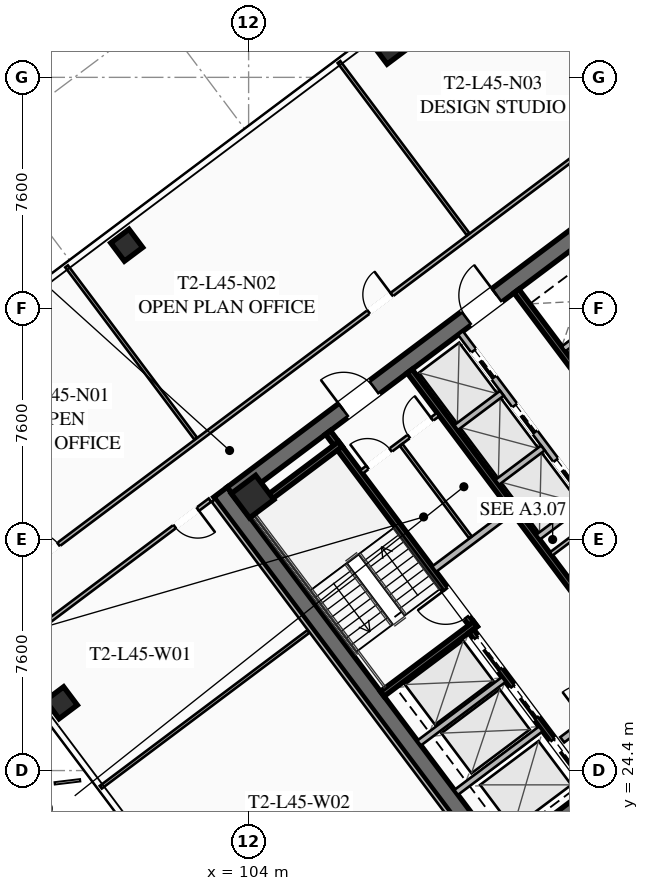
"""IFC4 building model, lengths in metres.
Left out: names, types, materials, properties, quantities, classifications, styles, units other than length and angle.
Written with IfcOpenShell. Run it as: python <this file> out.ifc"""

import sys

from ifc_helpers import new_model, si_unit, direction, frame, frame_2d, origin, origin_2d, place, context, subcontext, project, spatial, rectangle, hollow_rectangle, extrude, element, fill, save


model = new_model("IFC4")
c1 = context("Model", 3, precision=1e-05, world=origin(), true_north=direction((0.0, 1.0)))
c2 = subcontext(c1, "Body", "Model", "MODEL_VIEW")
j1 = project(units=[si_unit("LENGTHUNIT", "METRE"), si_unit("PLANEANGLEUNIT", "RADIAN")], contexts=[c1])
p1 = place(None, origin())
s1 = spatial("IfcSite", under=j1, at=p1, CompositionType="ELEMENT")
p2 = place(p1, origin())
s2 = spatial("IfcBuilding", under=s1, at=p2, CompositionType="ELEMENT")
p3 = place(p2, frame((0.0, 0.0, 167.65)))
s3 = spatial("IfcBuildingStorey", under=s2, at=p3, CompositionType="ELEMENT", Elevation=167.65)
p4 = place(p3, frame((112.436, 21.077, 0.0), z_axis=(0.0, 0.0, 1.0), x_axis=(-0.600005007985, 0.799996243986, 0.0)))
e1 = element("IfcWall", 1, at=p4, inside=s3, PredefinedType="SHEAR", context=c2, shape_type="SweptSolid", body=[
    extrude(rectangle(XDim=15.6, YDim=0.55, at=frame_2d((7.8, 0.0))), origin(), (0.0, 0.0, 1.0), 3.55),
])
p5 = place(p3, frame((124.539, 30.498, 0.0), z_axis=(0.0, 0.0, 1.0), x_axis=(-0.799998054672, -0.600002593761, 0.0)))
e2 = element("IfcWall", 2, at=p5, inside=s3, PredefinedType="SHEAR", context=c2, shape_type="SweptSolid", body=[
    extrude(rectangle(XDim=15.06, YDim=0.55, at=frame_2d((7.53, 0.0))), origin(), (0.0, 0.0, 1.0), 3.55),
])
p6 = place(p5, frame((9.23, 0.0, 0.0)))
e3 = element("IfcOpeningElement", 3, at=p6, cuts=e2, PredefinedType="OPENING", context=c2, shape_type="SweptSolid", body=[
    extrude(rectangle(XDim=1.25, YDim=2.25, at=frame_2d((0.625, 1.125))), frame((0.0, 0.285, 0.0), z_axis=(0.0, -1.0, 0.0), x_axis=(1.0, 0.0, 0.0)), (0.0, 0.0, 1.0), 0.57),
])
p7 = place(p5, frame((4.18, 0.0, 0.0)))
e4 = element("IfcOpeningElement", 4, at=p7, cuts=e2, PredefinedType="OPENING", context=c2, shape_type="SweptSolid", body=[
    extrude(rectangle(XDim=1.25, YDim=2.25, at=frame_2d((0.625, 1.125))), frame((0.0, 0.285, 0.0), z_axis=(0.0, -1.0, 0.0), x_axis=(1.0, 0.0, 0.0)), (0.0, 0.0, 1.0), 0.57),
])
p8 = place(p3, frame((103.461, 33.502, 0.0), z_axis=(0.0, 0.0, 1.0), x_axis=(0.799998054672, 0.600002593761, 0.0)))
e5 = element("IfcWall", 5, at=p8, inside=s3, PredefinedType="SHEAR", context=c2, shape_type="SweptSolid", body=[
    extrude(rectangle(XDim=15.06, YDim=0.55, at=frame_2d((7.53, 0.0))), origin(), (0.0, 0.0, 1.0), 3.55),
])
p9 = place(p8, frame((4.58, 0.0, 0.0)))
e6 = element("IfcOpeningElement", 6, at=p9, cuts=e5, PredefinedType="OPENING", context=c2, shape_type="SweptSolid", body=[
    extrude(rectangle(XDim=1.25, YDim=2.25, at=frame_2d((0.625, 1.125))), frame((0.0, 0.285, 0.0), z_axis=(0.0, -1.0, 0.0), x_axis=(1.0, 0.0, 0.0)), (0.0, 0.0, 1.0), 0.57),
])
p10 = place(p8, frame((9.63, 0.0, 0.0)))
e7 = element("IfcOpeningElement", 7, at=p10, cuts=e5, PredefinedType="OPENING", context=c2, shape_type="SweptSolid", body=[
    extrude(rectangle(XDim=1.25, YDim=2.25, at=frame_2d((0.625, 1.125))), frame((0.0, 0.285, 0.0), z_axis=(0.0, -1.0, 0.0), x_axis=(1.0, 0.0, 0.0)), (0.0, 0.0, 1.0), 0.57),
])
p11 = place(p3, frame((104.13, 33.41, 0.0), z_axis=(0.0, 0.0, 1.0), x_axis=(0.799999996291, 0.600000004945, 0.0)))
e8 = element("IfcColumn", 8, at=p11, inside=s3, PredefinedType="COLUMN", context=c2, shape_type="SweptSolid", body=[
    extrude(hollow_rectangle(XDim=1.0, YDim=1.0, WallThickness=0.04, at=origin_2d()), origin(), (0.0, 0.0, 1.0), 3.37),
])
for number, where, z_axis, x_axis in (
    (9, (108.63, 48.16, 0.0), (0.0, 0.0, 1.0), (0.8, 0.6, 0.0)),
    (10, (99.99, 41.68, 0.0), (0.0, 0.0, 1.0), (0.8, 0.6, 0.0)),
    (11, (97.84, 26.63, 0.0), (0.0, 0.0, 1.0), (0.8, 0.6, 0.0)),
):
    element("IfcColumn", number, at=place(p3, frame(where, z_axis=z_axis, x_axis=x_axis)), inside=s3, PredefinedType="COLUMN", context=c2, shape_type="SweptSolid", body=[
        extrude(hollow_rectangle(XDim=0.75, YDim=0.75, WallThickness=0.032, at=origin_2d()), origin(), (0.0, 0.0, 1.0), 3.37),
    ])
p12 = place(p3, frame((111.44, 29.08, 0.0), z_axis=(0.0, 0.0, 1.0), x_axis=(-0.59999029481, 0.8000072788, 0.0)))
e12 = element("IfcWall", 12, at=p12, inside=s3, PredefinedType="SHEAR", context=c2, shape_type="SweptSolid", body=[
    extrude(rectangle(XDim=8.05, YDim=0.2, at=frame_2d((4.025, 0.0))), origin(), (0.0, 0.0, 1.0), 3.37),
])
p13 = place(p12, frame((0.45, 0.0, 0.0)))
e13 = element("IfcOpeningElement", 13, at=p13, cuts=e12, PredefinedType="OPENING", context=c2, shape_type="SweptSolid", body=[
    extrude(rectangle(XDim=1.15, YDim=2.2, at=frame_2d((0.575, 1.1))), frame((0.0, 0.11, 0.0), z_axis=(0.0, -1.0, 0.0), x_axis=(1.0, 0.0, 0.0)), (0.0, 0.0, 1.0), 0.22),
])
for number, where, z_axis, x_axis in (
    (14, (108.396, 26.922, 0.0), (0.0, 0.0, 1.0), (0.8, 0.6, 0.0)),
    (15, (103.956, 32.842, 0.0), (0.0, 0.0, 1.0), (0.8, 0.6, 0.0)),
):
    element("IfcWall", number, at=place(p3, frame(where, z_axis=z_axis, x_axis=x_axis)), inside=s3, PredefinedType="SHEAR", context=c2, shape_type="SweptSolid", body=[
        extrude(rectangle(XDim=3.83, YDim=0.2, at=frame_2d((1.915, 0.0))), origin(), (0.0, 0.0, 1.0), 3.37),
    ])
p14 = place(p3, frame((117.998, 25.936, 0.0), z_axis=(0.0, 0.0, 1.0), x_axis=(-0.600002693989, 0.799997979501, 0.0)))
e16 = element("IfcWall", 16, at=p14, inside=s3, PredefinedType="SHEAR", context=c2, shape_type="SweptSolid", body=[
    extrude(rectangle(XDim=14.5, YDim=0.2, at=frame_2d((7.25, 0.0))), origin(), (0.0, 0.0, 1.0), 3.37),
])
p15 = place(p3, frame((110.104, 31.028, 0.0), z_axis=(0.0, 0.0, 1.0), x_axis=(0.800018601094, 0.59997519774, 0.0)))
e17 = element("IfcWall", 17, at=p15, inside=s3, PredefinedType="SOLIDWALL", context=c2, shape_type="SweptSolid", body=[
    extrude(rectangle(XDim=3.15, YDim=0.22, at=frame_2d((1.575, 0.0))), origin(), (0.0, 0.0, 1.0), 2.723),
])
p16 = place(p3, frame((114.316, 25.412, 0.0), z_axis=(0.0, 0.0, 1.0), x_axis=(0.800018601094, 0.59997519774, 0.0)))
e18 = element("IfcWall", 18, at=p16, inside=s3, PredefinedType="SOLIDWALL", context=c2, shape_type="SweptSolid", body=[
    extrude(rectangle(XDim=3.15, YDim=0.22, at=frame_2d((1.575, 0.0))), origin(), (0.0, 0.0, 1.0), 2.723),
])
p17 = place(p16, frame((0.95, 0.0, 0.0)))
e19 = element("IfcOpeningElement", 19, at=p17, cuts=e18, PredefinedType="OPENING", context=c2, shape_type="SweptSolid", body=[
    extrude(rectangle(XDim=1.25, YDim=2.25, at=frame_2d((0.625, 1.125))), frame((0.0, 0.12, 0.0), z_axis=(0.0, -1.0, 0.0), x_axis=(1.0, 0.0, 0.0)), (0.0, 0.0, 1.0), 0.24),
])
p18 = place(p3, frame((115.19, 23.83, 0.0), z_axis=(0.0, 0.0, 1.0), x_axis=(-0.599993943644, 0.800004542231, 0.0)))
e20 = element("IfcWall", 20, at=p18, inside=s3, PredefinedType="SHEAR", context=c2, shape_type="SweptSolid", body=[
    extrude(rectangle(XDim=6.45, YDim=0.2, at=frame_2d((3.225, 0.0))), origin(), (0.0, 0.0, 1.0), 3.37),
])
p19 = place(p18, frame((4.875, 0.0, 0.0)))
e21 = element("IfcOpeningElement", 21, at=p19, cuts=e20, PredefinedType="OPENING", context=c2, shape_type="SweptSolid", body=[
    extrude(rectangle(XDim=1.3, YDim=2.25, at=frame_2d((0.65, 1.125))), frame((0.0, 0.11, 0.0), z_axis=(0.0, -1.0, 0.0), x_axis=(1.0, 0.0, 0.0)), (0.0, 0.0, 1.0), 0.22),
])
p20 = place(p18, frame((2.875, 0.0, 0.0)))
e22 = element("IfcOpeningElement", 22, at=p20, cuts=e20, PredefinedType="OPENING", context=c2, shape_type="SweptSolid", body=[
    extrude(rectangle(XDim=1.3, YDim=2.25, at=frame_2d((0.65, 1.125))), frame((0.0, 0.11, 0.0), z_axis=(0.0, -1.0, 0.0), x_axis=(1.0, 0.0, 0.0)), (0.0, 0.0, 1.0), 0.22),
])
p21 = place(p18, frame((0.675, 0.0, 0.0)))
e23 = element("IfcOpeningElement", 23, at=p21, cuts=e20, PredefinedType="OPENING", context=c2, shape_type="SweptSolid", body=[
    extrude(rectangle(XDim=1.3, YDim=2.25, at=frame_2d((0.65, 1.125))), frame((0.0, 0.11, 0.0), z_axis=(0.0, -1.0, 0.0), x_axis=(1.0, 0.0, 0.0)), (0.0, 0.0, 1.0), 0.22),
])
for number, where, z_axis, x_axis in (
    (24, (110.826, 23.682, 0.0), (0.0, 0.0, 1.0), (0.8, 0.6, 0.0)),
    (25, (109.608, 25.306, 0.0), (0.0, 0.0, 1.0), (0.8, 0.6, 0.0)),
):
    element("IfcWall", number, at=place(p3, frame(where, z_axis=z_axis, x_axis=x_axis)), inside=s3, PredefinedType="SOLIDWALL", context=c2, shape_type="SweptSolid", body=[
        extrude(rectangle(XDim=3.48, YDim=0.2, at=frame_2d((1.74, 0.0))), origin(), (0.0, 0.0, 1.0), 3.37),
    ])
p22 = place(p3, frame((112.81, 40.17, 0.0), z_axis=(0.0, 0.0, 1.0), x_axis=(0.599993943644, -0.800004542231, 0.0)))
e26 = element("IfcWall", 26, at=p22, inside=s3, PredefinedType="SHEAR", context=c2, shape_type="SweptSolid", body=[
    extrude(rectangle(XDim=6.45, YDim=0.2, at=frame_2d((3.225, 0.0))), origin(), (0.0, 0.0, 1.0), 3.37),
])
p23 = place(p3, frame((114.36, 38.27, 0.0), z_axis=(0.0, 0.0, 1.0), x_axis=(0.800008418847, 0.599988774707, 0.0)))
e27 = element("IfcWall", 27, at=p23, inside=s3, PredefinedType="SOLIDWALL", context=c2, shape_type="SweptSolid", body=[
    extrude(rectangle(XDim=3.48, YDim=0.2, at=frame_2d((1.74, 0.0))), origin(), (0.0, 0.0, 1.0), 3.37),
])
p24 = place(p3, frame((107.71, 34.22, 0.0), z_axis=(0.0, 0.0, 1.0), x_axis=(0.799981399002, 0.60002480053, 0.0)))
e28 = element("IfcWall", 28, at=p24, inside=s3, PredefinedType="PARTITIONING", context=c2, shape_type="SweptSolid", body=[
    extrude(rectangle(XDim=3.15, YDim=0.135, at=frame_2d((1.575, 0.0))), origin(), (0.0, 0.0, 1.0), 2.723),
])
p25 = place(p24, frame((0.25, 0.0, 0.0)))
e29 = element("IfcOpeningElement", 29, at=p25, cuts=e28, PredefinedType="OPENING", context=c2, shape_type="SweptSolid", body=[
    extrude(rectangle(XDim=0.95, YDim=2.05, at=frame_2d((0.475, 1.025))), frame((0.0, 0.077, 0.0), z_axis=(0.0, -1.0, 0.0), x_axis=(1.0, 0.0, 0.0)), (0.0, 0.0, 1.0), 0.155),
])
p26 = place(p24, frame((1.95, 0.0, 0.0)))
e30 = element("IfcOpeningElement", 30, at=p26, cuts=e28, PredefinedType="OPENING", context=c2, shape_type="SweptSolid", body=[
    extrude(rectangle(XDim=0.95, YDim=2.05, at=frame_2d((0.475, 1.025))), frame((0.0, 0.077, 0.0), z_axis=(0.0, -1.0, 0.0), x_axis=(1.0, 0.0, 0.0)), (0.0, 0.0, 1.0), 0.155),
])
p27 = place(p3, frame((111.296, 32.072, 0.0), z_axis=(0.0, 0.0, 1.0), x_axis=(-0.59995887973, 0.800030838552, 0.0)))
e31 = element("IfcWall", 31, at=p27, inside=s3, PredefinedType="PARTITIONING", context=c2, shape_type="SweptSolid", body=[
    extrude(rectangle(XDim=3.8, YDim=0.11, at=frame_2d((1.9, 0.0))), origin(), (0.0, 0.0, 1.0), 2.723),
])
p28 = place(p3, frame((113.946, 31.522, 0.0), z_axis=(0.0, 0.0, 1.0), x_axis=(0.8, 0.6, 0.0)))
e32 = element("IfcWall", 32, at=p28, inside=s3, PredefinedType="PARTITIONING", context=c2, shape_type="SweptSolid", body=[
    extrude(rectangle(XDim=1.88, YDim=0.135, at=frame_2d((0.94, 0.0))), origin(), (0.0, 0.0, 1.0), 2.723),
])
p29 = place(p3, frame((115.11, 33.27, 0.0), z_axis=(0.0, 0.0, 1.0), x_axis=(-0.600011322243, 0.799991508192, 0.0)))
e33 = element("IfcWall", 33, at=p29, inside=s3, PredefinedType="SOLIDWALL", context=c2, shape_type="SweptSolid", body=[
    extrude(rectangle(XDim=6.9, YDim=0.2, at=frame_2d((3.45, 0.0))), origin(), (0.0, 0.0, 1.0), 3.37),
])
p30 = place(p29, frame((0.575, 0.0, 0.0)))
e34 = element("IfcOpeningElement", 34, at=p30, cuts=e33, PredefinedType="OPENING", context=c2, shape_type="SweptSolid", body=[
    extrude(rectangle(XDim=1.1, YDim=2.2, at=frame_2d((0.55, 1.1))), frame((0.0, 0.11, 0.0), z_axis=(0.0, -1.0, 0.0), x_axis=(1.0, 0.0, 0.0)), (0.0, 0.0, 1.0), 0.22),
])
p31 = place(p29, frame((2.825, 0.0, 0.0)))
e35 = element("IfcOpeningElement", 35, at=p31, cuts=e33, PredefinedType="OPENING", context=c2, shape_type="SweptSolid", body=[
    extrude(rectangle(XDim=1.1, YDim=2.2, at=frame_2d((0.55, 1.1))), frame((0.0, 0.11, 0.0), z_axis=(0.0, -1.0, 0.0), x_axis=(1.0, 0.0, 0.0)), (0.0, 0.0, 1.0), 0.22),
])
p32 = place(p29, frame((5.075, 0.0, 0.0)))
e36 = element("IfcOpeningElement", 36, at=p32, cuts=e33, PredefinedType="OPENING", context=c2, shape_type="SweptSolid", body=[
    extrude(rectangle(XDim=1.1, YDim=2.2, at=frame_2d((0.55, 1.1))), frame((0.0, 0.11, 0.0), z_axis=(0.0, -1.0, 0.0), x_axis=(1.0, 0.0, 0.0)), (0.0, 0.0, 1.0), 0.22),
])
p33 = place(p3, frame((113.526, 32.082, 0.0), z_axis=(0.0, 0.0, 1.0), x_axis=(0.800046745961, 0.599937666993, 0.0)))
e37 = element("IfcWall", 37, at=p33, inside=s3, PredefinedType="SOLIDWALL", context=c2, shape_type="SweptSolid", body=[
    extrude(rectangle(XDim=1.88, YDim=0.2, at=frame_2d((0.94, 0.0))), origin(), (0.0, 0.0, 1.0), 3.37),
])
p34 = place(p3, frame((112.176, 33.882, 0.0), z_axis=(0.0, 0.0, 1.0), x_axis=(0.8, 0.6, 0.0)))
e38 = element("IfcWall", 38, at=p34, inside=s3, PredefinedType="SOLIDWALL", context=c2, shape_type="SweptSolid", body=[
    extrude(rectangle(XDim=1.88, YDim=0.2, at=frame_2d((0.94, 0.0))), origin(), (0.0, 0.0, 1.0), 3.37),
])
p35 = place(p3, frame((110.826, 35.682, 0.0), z_axis=(0.0, 0.0, 1.0), x_axis=(0.799984418148, 0.600020775241, 0.0)))
e39 = element("IfcWall", 39, at=p35, inside=s3, PredefinedType="SOLIDWALL", context=c2, shape_type="SweptSolid", body=[
    extrude(rectangle(XDim=1.88, YDim=0.2, at=frame_2d((0.94, 0.0))), origin(), (0.0, 0.0, 1.0), 3.37),
])
p36 = place(p3, frame((96.748, 31.086, 0.0), z_axis=(0.0, 0.0, 1.0), x_axis=(0.8, 0.6, 0.0)))
e40 = element("IfcWall", 40, at=p36, inside=s3, PredefinedType="PARTITIONING", context=c2, shape_type="SweptSolid", body=[
    extrude(rectangle(XDim=28.7, YDim=0.135, at=frame_2d((14.35, 0.0))), origin(), (0.0, 0.0, 1.0), 2.723),
])
p37 = place(p36, frame((0.3, 0.0, 0.0)))
e41 = element("IfcOpeningElement", 41, at=p37, cuts=e40, PredefinedType="OPENING", context=c2, shape_type="SweptSolid", body=[
    extrude(rectangle(XDim=0.95, YDim=2.05, at=frame_2d((0.475, 1.025))), frame((0.0, 0.077, 0.0), z_axis=(0.0, -1.0, 0.0), x_axis=(1.0, 0.0, 0.0)), (0.0, 0.0, 1.0), 0.155),
])
p38 = place(p36, frame((13.999, 0.0, 0.0)))
e42 = element("IfcOpeningElement", 42, at=p38, cuts=e40, PredefinedType="OPENING", context=c2, shape_type="SweptSolid", body=[
    extrude(rectangle(XDim=0.95, YDim=2.05, at=frame_2d((0.475, 1.025))), frame((0.0, 0.077, 0.0), z_axis=(0.0, -1.0, 0.0), x_axis=(1.0, 0.0, 0.0)), (0.0, 0.0, 1.0), 0.155),
])
p39 = place(p36, frame((27.45, 0.0, 0.0)))
e43 = element("IfcOpeningElement", 43, at=p39, cuts=e40, PredefinedType="OPENING", context=c2, shape_type="SweptSolid", body=[
    extrude(rectangle(XDim=0.95, YDim=2.05, at=frame_2d((0.475, 1.025))), frame((0.0, 0.077, 0.0), z_axis=(0.0, -1.0, 0.0), x_axis=(1.0, 0.0, 0.0)), (0.0, 0.0, 1.0), 0.155),
])
p40 = place(p3, frame((102.26, 35.32, 0.0), z_axis=(0.0, 0.0, 1.0), x_axis=(-0.600016552052, 0.799987585693, 0.0)))
e44 = element("IfcWall", 44, at=p40, inside=s3, PredefinedType="PARTITIONING", context=c2, shape_type="SweptSolid", body=[
    extrude(rectangle(XDim=7.08, YDim=0.11, at=frame_2d((3.54, 0.0))), origin(), (0.0, 0.0, 1.0), 2.723),
])
p41 = place(p3, frame((111.22, 42.04, 0.0), z_axis=(0.0, 0.0, 1.0), x_axis=(-0.6, 0.8, 0.0)))
e45 = element("IfcWall", 45, at=p41, inside=s3, PredefinedType="PARTITIONING", context=c2, shape_type="SweptSolid", body=[
    extrude(rectangle(XDim=7.08, YDim=0.11, at=frame_2d((3.54, 0.0))), origin(), (0.0, 0.0, 1.0), 2.723),
])
p42 = place(p3, frame((132.23, 31.61, 0.0), z_axis=(0.0, 0.0, 1.0), x_axis=(-0.799995916807, -0.600005444218, 0.0)))
e46 = element("IfcWall", 46, at=p42, inside=s3, PredefinedType="PARTITIONING", context=c2, shape_type="SweptSolid", body=[
    extrude(rectangle(XDim=28.7, YDim=0.135, at=frame_2d((14.35, 0.0))), origin(), (0.0, 0.0, 1.0), 2.723),
])
p43 = place(p42, frame((27.37, 0.0, 0.0)))
e47 = element("IfcOpeningElement", 47, at=p43, cuts=e46, PredefinedType="OPENING", context=c2, shape_type="SweptSolid", body=[
    extrude(rectangle(XDim=0.95, YDim=2.05, at=frame_2d((0.475, 1.025))), frame((0.0, 0.077, 0.0), z_axis=(0.0, -1.0, 0.0), x_axis=(1.0, 0.0, 0.0)), (0.0, 0.0, 1.0), 0.155),
])
p44 = place(p42, frame((13.775, 0.0, 0.0)))
e48 = element("IfcOpeningElement", 48, at=p44, cuts=e46, PredefinedType="OPENING", context=c2, shape_type="SweptSolid", body=[
    extrude(rectangle(XDim=0.95, YDim=2.05, at=frame_2d((0.475, 1.025))), frame((0.0, 0.077, 0.0), z_axis=(0.0, -1.0, 0.0), x_axis=(1.0, 0.0, 0.0)), (0.0, 0.0, 1.0), 0.155),
])
p45 = place(p42, frame((0.38, 0.0, 0.0)))
e49 = element("IfcOpeningElement", 49, at=p45, cuts=e46, PredefinedType="OPENING", context=c2, shape_type="SweptSolid", body=[
    extrude(rectangle(XDim=0.95, YDim=2.05, at=frame_2d((0.475, 1.025))), frame((0.0, 0.077, 0.0), z_axis=(0.0, -1.0, 0.0), x_axis=(1.0, 0.0, 0.0)), (0.0, 0.0, 1.0), 0.155),
])
p46 = place(p3, frame((112.104, 20.928, 0.0), z_axis=(0.0, 0.0, 1.0), x_axis=(-0.599994940075, 0.800003794918, 0.0)))
e50 = element("IfcWall", 50, at=p46, inside=s3, PredefinedType="PARTITIONING", context=c2, shape_type="SweptSolid", body=[
    extrude(rectangle(XDim=15.44, YDim=0.135, at=frame_2d((7.72, 0.0))), origin(), (0.0, 0.0, 1.0), 2.723),
])
p47 = place(p3, frame((102.728, 33.296, 0.0), z_axis=(0.0, 0.0, 1.0), x_axis=(-0.800013722153, -0.59998170336, 0.0)))
e51 = element("IfcWall", 51, at=p47, inside=s3, PredefinedType="PARTITIONING", context=c2, shape_type="SweptSolid", body=[
    extrude(rectangle(XDim=8.54, YDim=0.135, at=frame_2d((4.27, 0.0))), origin(), (0.0, 0.0, 1.0), 2.723),
])
p48 = place(p47, frame((0.5, 0.0, 0.0)))
e52 = element("IfcOpeningElement", 52, at=p48, cuts=e51, PredefinedType="OPENING", context=c2, shape_type="SweptSolid", body=[
    extrude(rectangle(XDim=0.95, YDim=2.05, at=frame_2d((0.475, 1.025))), frame((0.0, 0.077, 0.0), z_axis=(0.0, -1.0, 0.0), x_axis=(1.0, 0.0, 0.0)), (0.0, 0.0, 1.0), 0.155),
])
p49 = place(p3, frame((99.136, 23.852, 0.0), z_axis=(0.0, 0.0, 1.0), x_axis=(0.8, 0.6, 0.0)))
e53 = element("IfcWall", 53, at=p49, inside=s3, PredefinedType="PARTITIONING", context=c2, shape_type="SweptSolid", body=[
    extrude(rectangle(XDim=8.54, YDim=0.11, at=frame_2d((4.27, 0.0))), origin(), (0.0, 0.0, 1.0), 2.723),
])
p50 = place(p9, origin())
e54 = element("IfcDoor", 54, at=p50, inside=s3, OperationType="SINGLE_SWING_LEFT", PredefinedType="DOOR", context=c2, shape_type="SweptSolid", body=[
    extrude(rectangle(XDim=1.25, YDim=2.25, at=frame_2d((0.625, 1.125))), frame((0.0, 0.025, 0.0), z_axis=(0.0, -1.0, 0.0), x_axis=(1.0, 0.0, 0.0)), (0.0, 0.0, 1.0), 0.05),
])
fill(e6, e54)
p51 = place(p10, origin())
e55 = element("IfcDoor", 55, at=p51, inside=s3, OperationType="SINGLE_SWING_RIGHT", PredefinedType="DOOR", context=c2, shape_type="SweptSolid", body=[
    extrude(rectangle(XDim=1.25, YDim=2.25, at=frame_2d((0.625, 1.125))), frame((0.0, 0.025, 0.0), z_axis=(0.0, -1.0, 0.0), x_axis=(1.0, 0.0, 0.0)), (0.0, 0.0, 1.0), 0.05),
])
fill(e7, e55)
p52 = place(p13, origin())
e56 = element("IfcDoor", 56, at=p52, inside=s3, OperationType="SINGLE_SWING_RIGHT", PredefinedType="DOOR", context=c2, shape_type="SweptSolid", body=[
    extrude(rectangle(XDim=1.15, YDim=2.2, at=frame_2d((0.575, 1.1))), frame((0.0, 0.025, 0.0), z_axis=(0.0, -1.0, 0.0), x_axis=(1.0, 0.0, 0.0)), (0.0, 0.0, 1.0), 0.05),
])
fill(e13, e56)
p53 = place(p25, origin())
e57 = element("IfcDoor", 57, at=p53, inside=s3, OperationType="SINGLE_SWING_LEFT", PredefinedType="DOOR", context=c2, shape_type="SweptSolid", body=[
    extrude(rectangle(XDim=0.95, YDim=2.05, at=frame_2d((0.475, 1.025))), frame((0.0, 0.025, 0.0), z_axis=(0.0, -1.0, 0.0), x_axis=(1.0, 0.0, 0.0)), (0.0, 0.0, 1.0), 0.05),
])
fill(e29, e57)
p54 = place(p26, origin())
e58 = element("IfcDoor", 58, at=p54, inside=s3, OperationType="SINGLE_SWING_RIGHT", PredefinedType="DOOR", context=c2, shape_type="SweptSolid", body=[
    extrude(rectangle(XDim=0.95, YDim=2.05, at=frame_2d((0.475, 1.025))), frame((0.0, 0.025, 0.0), z_axis=(0.0, -1.0, 0.0), x_axis=(1.0, 0.0, 0.0)), (0.0, 0.0, 1.0), 0.05),
])
fill(e30, e58)
p55 = place(p37, origin())
e59 = element("IfcDoor", 59, at=p55, inside=s3, OperationType="SINGLE_SWING_LEFT", PredefinedType="DOOR", context=c2, shape_type="SweptSolid", body=[
    extrude(rectangle(XDim=0.95, YDim=2.05, at=frame_2d((0.475, 1.025))), frame((0.0, 0.025, 0.0), z_axis=(0.0, -1.0, 0.0), x_axis=(1.0, 0.0, 0.0)), (0.0, 0.0, 1.0), 0.05),
])
fill(e41, e59)
p56 = place(p38, origin())
e60 = element("IfcDoor", 60, at=p56, inside=s3, OperationType="SINGLE_SWING_RIGHT", PredefinedType="DOOR", context=c2, shape_type="SweptSolid", body=[
    extrude(rectangle(XDim=0.95, YDim=2.05, at=frame_2d((0.475, 1.025))), frame((0.0, 0.025, 0.0), z_axis=(0.0, -1.0, 0.0), x_axis=(1.0, 0.0, 0.0)), (0.0, 0.0, 1.0), 0.05),
])
fill(e42, e60)
p57 = place(p48, origin())
e61 = element("IfcDoor", 61, at=p57, inside=s3, OperationType="SINGLE_SWING_LEFT", PredefinedType="DOOR", context=c2, shape_type="SweptSolid", body=[
    extrude(rectangle(XDim=0.95, YDim=2.05, at=frame_2d((0.475, 1.025))), frame((0.0, 0.025, 0.0), z_axis=(0.0, -1.0, 0.0), x_axis=(1.0, 0.0, 0.0)), (0.0, 0.0, 1.0), 0.05),
])
fill(e52, e61)
p58 = place(p19, origin())
e62 = element("IfcDoor", 62, at=p58, inside=s3, OperationType="SLIDING_TO_LEFT", PredefinedType="DOOR", context=c2, shape_type="SweptSolid", body=[
    extrude(rectangle(XDim=1.3, YDim=2.25, at=frame_2d((0.65, 1.125))), frame((0.0, 0.025, 0.0), z_axis=(0.0, -1.0, 0.0), x_axis=(1.0, 0.0, 0.0)), (0.0, 0.0, 1.0), 0.05),
])
fill(e21, e62)
p59 = place(p20, origin())
e63 = element("IfcDoor", 63, at=p59, inside=s3, OperationType="SLIDING_TO_LEFT", PredefinedType="DOOR", context=c2, shape_type="SweptSolid", body=[
    extrude(rectangle(XDim=1.3, YDim=2.25, at=frame_2d((0.65, 1.125))), frame((0.0, 0.025, 0.0), z_axis=(0.0, -1.0, 0.0), x_axis=(1.0, 0.0, 0.0)), (0.0, 0.0, 1.0), 0.05),
])
fill(e22, e63)
p60 = place(p21, origin())
e64 = element("IfcDoor", 64, at=p60, inside=s3, OperationType="SLIDING_TO_LEFT", PredefinedType="DOOR", context=c2, shape_type="SweptSolid", body=[
    extrude(rectangle(XDim=1.3, YDim=2.25, at=frame_2d((0.65, 1.125))), frame((0.0, 0.025, 0.0), z_axis=(0.0, -1.0, 0.0), x_axis=(1.0, 0.0, 0.0)), (0.0, 0.0, 1.0), 0.05),
])
fill(e23, e64)
p61 = place(p30, origin())
e65 = element("IfcDoor", 65, at=p61, inside=s3, OperationType="SLIDING_TO_LEFT", PredefinedType="DOOR", context=c2, shape_type="SweptSolid", body=[
    extrude(rectangle(XDim=1.1, YDim=2.2, at=frame_2d((0.55, 1.1))), frame((0.0, 0.025, 0.0), z_axis=(0.0, -1.0, 0.0), x_axis=(1.0, 0.0, 0.0)), (0.0, 0.0, 1.0), 0.05),
])
fill(e34, e65)
p62 = place(p31, origin())
e66 = element("IfcDoor", 66, at=p62, inside=s3, OperationType="SLIDING_TO_LEFT", PredefinedType="DOOR", context=c2, shape_type="SweptSolid", body=[
    extrude(rectangle(XDim=1.1, YDim=2.2, at=frame_2d((0.55, 1.1))), frame((0.0, 0.025, 0.0), z_axis=(0.0, -1.0, 0.0), x_axis=(1.0, 0.0, 0.0)), (0.0, 0.0, 1.0), 0.05),
])
fill(e35, e66)
p63 = place(p32, origin())
e67 = element("IfcDoor", 67, at=p63, inside=s3, OperationType="SLIDING_TO_LEFT", PredefinedType="DOOR", context=c2, shape_type="SweptSolid", body=[
    extrude(rectangle(XDim=1.1, YDim=2.2, at=frame_2d((0.55, 1.1))), frame((0.0, 0.025, 0.0), z_axis=(0.0, -1.0, 0.0), x_axis=(1.0, 0.0, 0.0)), (0.0, 0.0, 1.0), 0.05),
])
fill(e36, e67)
save(model, sys.argv[1])
